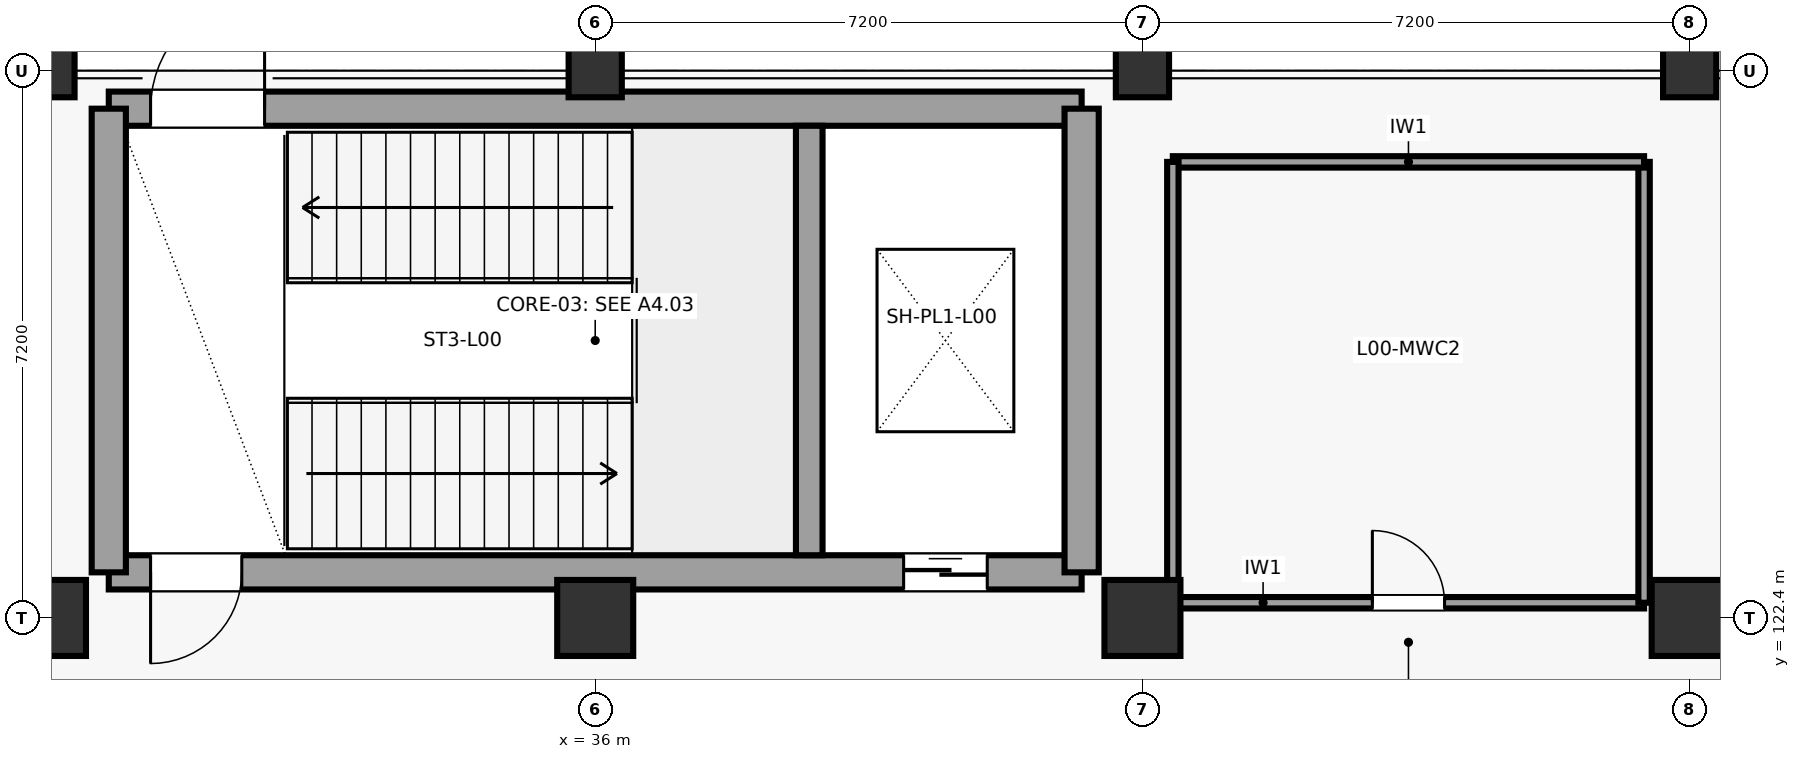
"""IFC4 building model, lengths in metres.
Left out: names, types, materials, properties, quantities, classifications, styles, units other than length and angle.
Written with IfcOpenShell. Run it as: python <this file> out.ifc"""

import sys

from ifc_helpers import new_model, si_unit, direction, frame, frame_2d, origin, origin_2d, place, context, subcontext, project, spatial, rectangle, circle, extrude, element, fill, save


model = new_model("IFC4")
c1 = context("Model", 3, precision=1e-05, world=origin(), true_north=direction((0.0, 1.0)))
c2 = subcontext(c1, "Body", "Model", "MODEL_VIEW")
j1 = project(units=[si_unit("LENGTHUNIT", "METRE"), si_unit("PLANEANGLEUNIT", "RADIAN")], contexts=[c1])
p1 = place(None, origin())
s1 = spatial("IfcSite", under=j1, at=p1, CompositionType="ELEMENT")
p2 = place(p1, origin())
s2 = spatial("IfcBuilding", under=s1, at=p2, CompositionType="ELEMENT")
p3 = place(p2, origin())
s3 = spatial("IfcBuildingStorey", under=s2, at=p3, CompositionType="ELEMENT", Elevation=0.0)
p4 = place(p3, frame((28.8, 122.4, 0.0), z_axis=(0.0, 0.0, 1.0), x_axis=(1.0, 0.0, 0.0)))
e1 = element("IfcColumn", 1, at=p4, inside=s3, PredefinedType="COLUMN", context=c2, shape_type="SweptSolid", body=[
    extrude(circle(Radius=0.5, at=origin_2d()), origin(), (0.0, 0.0, 1.0), 5.4),
])
p5 = place(p3, frame((28.8, 129.6, 0.0), z_axis=(0.0, 0.0, 1.0), x_axis=(1.0, 0.0, 0.0)))
e2 = element("IfcColumn", 2, at=p5, inside=s3, PredefinedType="COLUMN", context=c2, shape_type="SweptSolid", body=[
    extrude(rectangle(XDim=0.7, YDim=0.7, at=origin_2d()), origin(), (0.0, 0.0, 1.0), 5.4),
])
p6 = place(p3, frame((36.0, 122.4, 0.0), z_axis=(0.0, 0.0, 1.0), x_axis=(1.0, 0.0, 0.0)))
e3 = element("IfcColumn", 3, at=p6, inside=s3, PredefinedType="COLUMN", context=c2, shape_type="SweptSolid", body=[
    extrude(circle(Radius=0.5, at=origin_2d()), origin(), (0.0, 0.0, 1.0), 5.4),
])
p7 = place(p3, frame((36.0, 129.6, 0.0), z_axis=(0.0, 0.0, 1.0), x_axis=(1.0, 0.0, 0.0)))
e4 = element("IfcColumn", 4, at=p7, inside=s3, PredefinedType="COLUMN", context=c2, shape_type="SweptSolid", body=[
    extrude(rectangle(XDim=0.7, YDim=0.7, at=origin_2d()), origin(), (0.0, 0.0, 1.0), 5.4),
])
p8 = place(p3, frame((43.2, 122.4, 0.0), z_axis=(0.0, 0.0, 1.0), x_axis=(1.0, 0.0, 0.0)))
e5 = element("IfcColumn", 5, at=p8, inside=s3, PredefinedType="COLUMN", context=c2, shape_type="SweptSolid", body=[
    extrude(circle(Radius=0.5, at=origin_2d()), origin(), (0.0, 0.0, 1.0), 5.4),
])
p9 = place(p3, frame((43.2, 129.6, 0.0), z_axis=(0.0, 0.0, 1.0), x_axis=(1.0, 0.0, 0.0)))
e6 = element("IfcColumn", 6, at=p9, inside=s3, PredefinedType="COLUMN", context=c2, shape_type="SweptSolid", body=[
    extrude(rectangle(XDim=0.7, YDim=0.7, at=origin_2d()), origin(), (0.0, 0.0, 1.0), 5.4),
])
p10 = place(p3, frame((50.4, 122.4, 0.0), z_axis=(0.0, 0.0, 1.0), x_axis=(1.0, 0.0, 0.0)))
e7 = element("IfcColumn", 7, at=p10, inside=s3, PredefinedType="COLUMN", context=c2, shape_type="SweptSolid", body=[
    extrude(circle(Radius=0.5, at=origin_2d()), origin(), (0.0, 0.0, 1.0), 5.4),
])
p11 = place(p3, frame((50.4, 129.6, 0.0), z_axis=(0.0, 0.0, 1.0), x_axis=(1.0, 0.0, 0.0)))
e8 = element("IfcColumn", 8, at=p11, inside=s3, PredefinedType="COLUMN", context=c2, shape_type="SweptSolid", body=[
    extrude(rectangle(XDim=0.7, YDim=0.7, at=origin_2d()), origin(), (0.0, 0.0, 1.0), 5.4),
])
p12 = place(p3, frame((29.6, 123.0, 0.0), z_axis=(0.0, 0.0, 1.0), x_axis=(1.0, 0.0, 0.0)))
e9 = element("IfcWall", 9, at=p12, inside=s3, PredefinedType="SHEAR", context=c2, shape_type="SweptSolid", body=[
    extrude(rectangle(XDim=12.8, YDim=0.45, at=frame_2d((6.4, 0.0))), origin(), (0.0, 0.0, 1.0), 5.06),
])
p13 = place(p12, frame((0.55, 0.0, 0.0)))
e10 = element("IfcOpeningElement", 10, at=p13, cuts=e9, PredefinedType="OPENING", context=c2, shape_type="SweptSolid", body=[
    extrude(rectangle(XDim=1.2, YDim=2.25, at=frame_2d((0.6, 1.125))), frame((0.0, 0.235, 0.0), z_axis=(0.0, -1.0, 0.0), x_axis=(1.0, 0.0, 0.0)), (0.0, 0.0, 1.0), 0.47),
])
p14 = place(p12, frame((10.458, 0.0, 0.0)))
e11 = element("IfcOpeningElement", 11, at=p14, cuts=e9, PredefinedType="OPENING", context=c2, shape_type="SweptSolid", body=[
    extrude(rectangle(XDim=1.1, YDim=2.2, at=frame_2d((0.55, 1.1))), frame((0.0, 0.235, 0.0), z_axis=(0.0, -1.0, 0.0), x_axis=(1.0, 0.0, 0.0)), (0.0, 0.0, 1.0), 0.47),
])
p15 = place(p3, frame((29.6, 129.1, 0.0), z_axis=(0.0, 0.0, 1.0), x_axis=(1.0, 0.0, 0.0)))
e12 = element("IfcWall", 12, at=p15, inside=s3, PredefinedType="SHEAR", context=c2, shape_type="SweptSolid", body=[
    extrude(rectangle(XDim=12.8, YDim=0.45, at=frame_2d((6.4, 0.0))), origin(), (0.0, 0.0, 1.0), 5.06),
])
p16 = place(p15, frame((0.55, 0.0, 0.0)))
e13 = element("IfcOpeningElement", 13, at=p16, cuts=e12, PredefinedType="OPENING", context=c2, shape_type="SweptSolid", body=[
    extrude(rectangle(XDim=1.5, YDim=2.25, at=frame_2d((0.75, 1.125))), frame((0.0, 0.235, 0.0), z_axis=(0.0, -1.0, 0.0), x_axis=(1.0, 0.0, 0.0)), (0.0, 0.0, 1.0), 0.47),
])
for number, where, z_axis, x_axis in (
    (14, (29.6, 123.0, 0.0), (0.0, 0.0, 1.0), (0.0, 1.0, 0.0)),
    (15, (42.4, 123.0, 0.0), (0.0, 0.0, 1.0), (0.0, 1.0, 0.0)),
):
    element("IfcWall", number, at=place(p3, frame(where, z_axis=z_axis, x_axis=x_axis)), inside=s3, PredefinedType="SHEAR", context=c2, shape_type="SweptSolid", body=[
        extrude(rectangle(XDim=6.1, YDim=0.45, at=frame_2d((3.05, 0.0))), origin(), (0.0, 0.0, 1.0), 5.06),
    ])
p17 = place(p3, frame((38.816, 123.225, 0.0), z_axis=(0.0, 0.0, 1.0), x_axis=(0.0, 1.0, 0.0)))
e16 = element("IfcWall", 16, at=p17, inside=s3, PredefinedType="SHEAR", context=c2, shape_type="SweptSolid", body=[
    extrude(rectangle(XDim=5.65, YDim=0.35, at=frame_2d((2.825, 0.0))), origin(), (0.0, 0.0, 1.0), 5.06),
])
p18 = place(p3, frame((43.6, 122.6, 0.0), z_axis=(0.0, 0.0, 1.0), x_axis=(1.0, 0.0, 0.0)))
e17 = element("IfcWall", 17, at=p18, inside=s3, PredefinedType="PARTITIONING", context=c2, shape_type="SweptSolid", body=[
    extrude(rectangle(XDim=6.2, YDim=0.15, at=frame_2d((3.1, 0.0))), origin(), (0.0, 0.0, 1.0), 4.1),
])
p19 = place(p18, frame((2.625, 0.0, 0.0)))
e18 = element("IfcOpeningElement", 18, at=p19, cuts=e17, PredefinedType="OPENING", context=c2, shape_type="SweptSolid", body=[
    extrude(rectangle(XDim=0.95, YDim=2.15, at=frame_2d((0.475, 1.075))), frame((0.0, 0.085, 0.0), z_axis=(0.0, -1.0, 0.0), x_axis=(1.0, 0.0, 0.0)), (0.0, 0.0, 1.0), 0.17),
])
p20 = place(p3, frame((49.8, 122.6, 0.0), z_axis=(0.0, 0.0, 1.0), x_axis=(0.0, 1.0, 0.0)))
e19 = element("IfcWall", 19, at=p20, inside=s3, PredefinedType="PARTITIONING", context=c2, shape_type="SweptSolid", body=[
    extrude(rectangle(XDim=5.8, YDim=0.15, at=frame_2d((2.9, 0.0))), origin(), (0.0, 0.0, 1.0), 4.1),
])
p21 = place(p3, frame((49.8, 128.4, 0.0), z_axis=(0.0, 0.0, 1.0), x_axis=(-1.0, 0.0, 0.0)))
e20 = element("IfcWall", 20, at=p21, inside=s3, PredefinedType="PARTITIONING", context=c2, shape_type="SweptSolid", body=[
    extrude(rectangle(XDim=6.2, YDim=0.15, at=frame_2d((3.1, 0.0))), origin(), (0.0, 0.0, 1.0), 4.1),
])
p22 = place(p3, frame((43.6, 128.4, 0.0), z_axis=(0.0, 0.0, 1.0), x_axis=(0.0, -1.0, 0.0)))
e21 = element("IfcWall", 21, at=p22, inside=s3, PredefinedType="PARTITIONING", context=c2, shape_type="SweptSolid", body=[
    extrude(rectangle(XDim=5.8, YDim=0.15, at=frame_2d((2.9, 0.0))), origin(), (0.0, 0.0, 1.0), 4.1),
])
p23 = place(p13, frame((1.2, 0.0, 0.0), z_axis=(0.0, 0.0, 1.0), x_axis=(-1.0, 0.0, 0.0)))
e22 = element("IfcDoor", 22, at=p23, inside=s3, OperationType="SINGLE_SWING_LEFT", PredefinedType="DOOR", context=c2, shape_type="SweptSolid", body=[
    extrude(rectangle(XDim=1.2, YDim=2.25, at=frame_2d((0.6, 1.125))), frame((0.0, 0.025, 0.0), z_axis=(0.0, -1.0, 0.0), x_axis=(1.0, 0.0, 0.0)), (0.0, 0.0, 1.0), 0.05),
])
fill(e10, e22)
p24 = place(p16, origin())
e23 = element("IfcDoor", 23, at=p24, inside=s3, OperationType="SINGLE_SWING_RIGHT", PredefinedType="DOOR", context=c2, shape_type="SweptSolid", body=[
    extrude(rectangle(XDim=1.5, YDim=2.25, at=frame_2d((0.75, 1.125))), frame((0.0, 0.025, 0.0), z_axis=(0.0, -1.0, 0.0), x_axis=(1.0, 0.0, 0.0)), (0.0, 0.0, 1.0), 0.05),
])
fill(e13, e23)
p25 = place(p14, origin())
e24 = element("IfcDoor", 24, at=p25, inside=s3, OperationType="SLIDING_TO_RIGHT", PredefinedType="DOOR", context=c2, shape_type="SweptSolid", body=[
    extrude(rectangle(XDim=1.1, YDim=2.2, at=frame_2d((0.55, 1.1))), frame((0.0, 0.025, 0.0), z_axis=(0.0, -1.0, 0.0), x_axis=(1.0, 0.0, 0.0)), (0.0, 0.0, 1.0), 0.05),
])
fill(e11, e24)
p26 = place(p19, origin())
e25 = element("IfcDoor", 25, at=p26, inside=s3, OperationType="SINGLE_SWING_LEFT", PredefinedType="DOOR", context=c2, shape_type="SweptSolid", body=[
    extrude(rectangle(XDim=0.95, YDim=2.15, at=frame_2d((0.475, 1.075))), frame((0.0, 0.025, 0.0), z_axis=(0.0, -1.0, 0.0), x_axis=(1.0, 0.0, 0.0)), (0.0, 0.0, 1.0), 0.05),
])
fill(e18, e25)
save(model, sys.argv[1])
